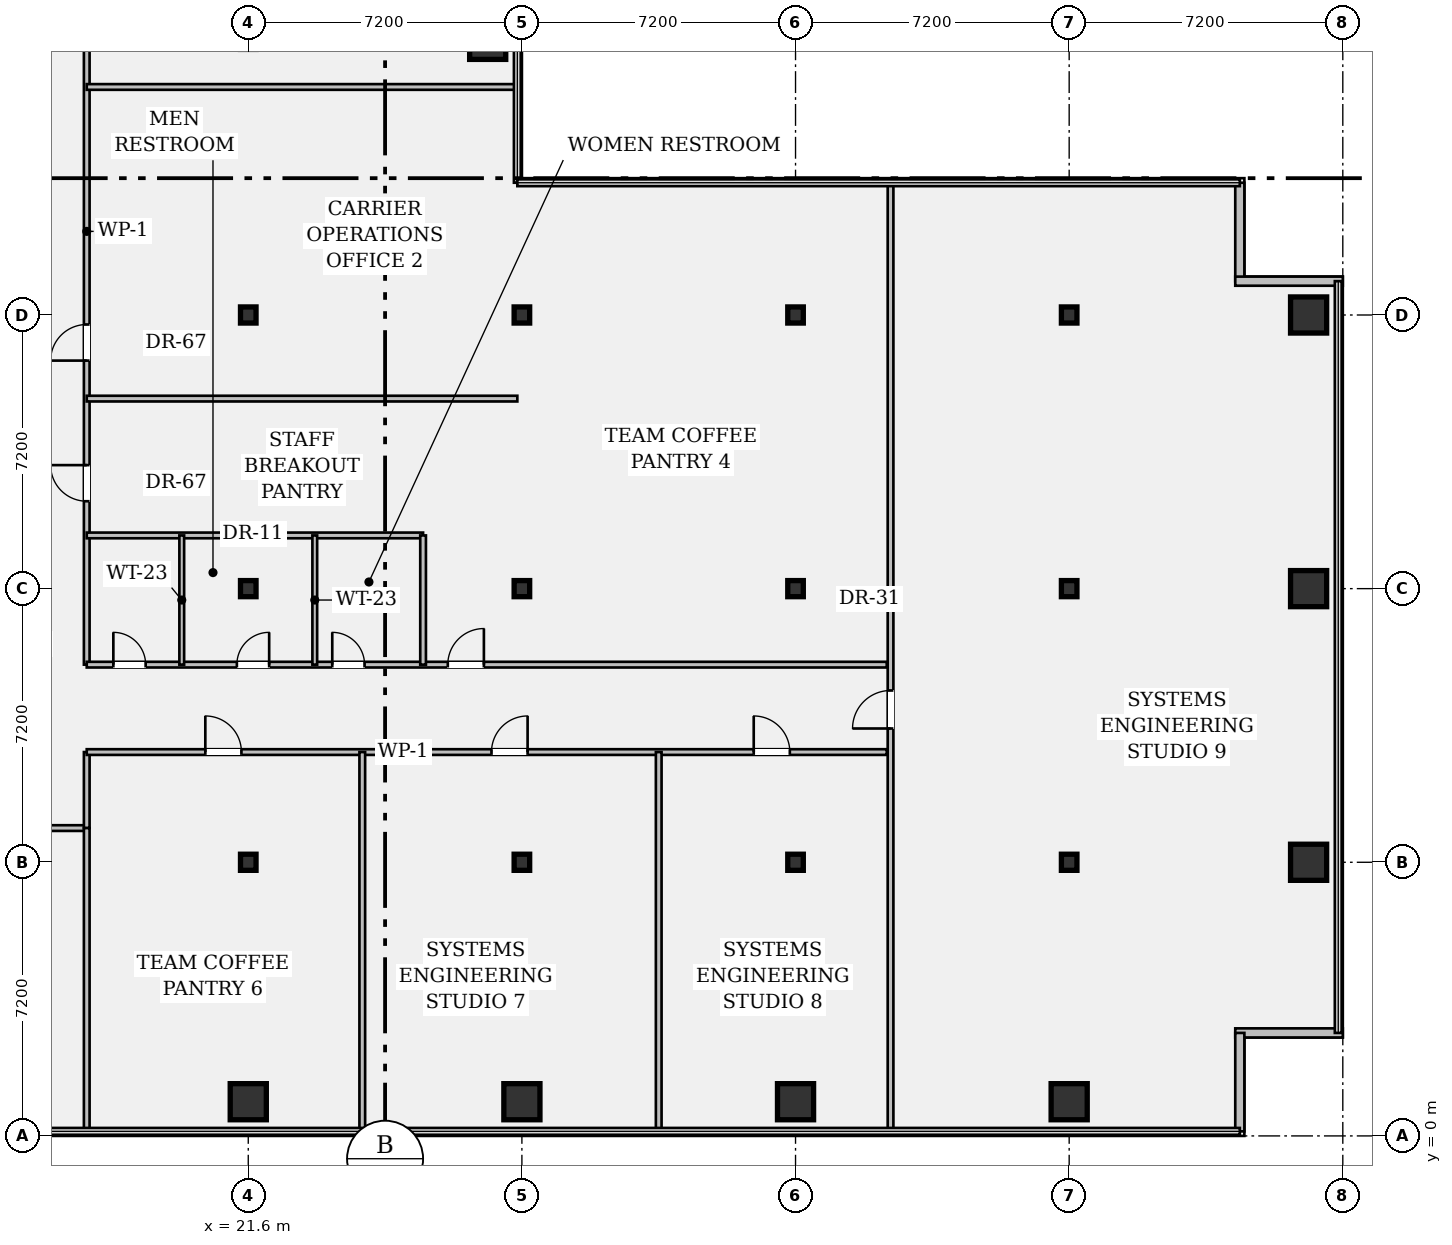
"""IFC4 building model, lengths in metres.
Left out: names, types, materials, properties, quantities, classifications, styles, units other than length and angle.
Written with IfcOpenShell. Run it as: python <this file> out.ifc"""

import sys

from ifc_helpers import new_model, si_unit, direction, frame, frame_2d, origin, origin_2d, place, context, subcontext, project, spatial, rectangle, hollow_rectangle, i_section, extrude, element, fill, save


model = new_model("IFC4")
c1 = context("Model", 3, precision=1e-05, world=origin(), true_north=direction((0.0, 1.0)))
c2 = subcontext(c1, "Body", "Model", "MODEL_VIEW")
j1 = project(units=[si_unit("LENGTHUNIT", "METRE"), si_unit("PLANEANGLEUNIT", "RADIAN")], contexts=[c1])
p1 = place(None, origin())
s1 = spatial("IfcSite", under=j1, at=p1, CompositionType="ELEMENT")
p2 = place(p1, origin())
s2 = spatial("IfcBuilding", under=s1, at=p2, CompositionType="ELEMENT")
p3 = place(p2, frame((0.0, 0.0, 85.05)))
s3 = spatial("IfcBuildingStorey", under=s2, at=p3, CompositionType="ELEMENT", Elevation=85.05)
p4 = place(p3, frame((21.6, 0.9, 0.0), z_axis=(0.0, 0.0, 1.0), x_axis=(1.0, 0.0, 0.0)))
e1 = element("IfcColumn", 1, at=p4, inside=s3, PredefinedType="COLUMN", context=c2, shape_type="SweptSolid", body=[
    extrude(hollow_rectangle(XDim=0.95, YDim=0.95, WallThickness=0.06, at=origin_2d()), origin(), (0.0, 0.0, 1.0), 3.57),
])
for number, where, z_axis, x_axis in (
    (2, (21.6, 7.2, 0.0), (0.0, 0.0, 1.0), (1.0, 0.0, 0.0)),
    (3, (21.6, 14.4, 0.0), (0.0, 0.0, 1.0), (1.0, 0.0, 0.0)),
    (4, (21.6, 21.6, 0.0), (0.0, 0.0, 1.0), (1.0, 0.0, 0.0)),
):
    element("IfcColumn", number, at=place(p3, frame(where, z_axis=z_axis, x_axis=x_axis)), inside=s3, PredefinedType="COLUMN", context=c2, shape_type="SweptSolid", body=[
        extrude(i_section(OverallWidth=0.409, OverallDepth=0.424, WebThickness=0.033, FlangeThickness=0.052, FilletRadius=0.018, at=origin_2d()), origin(), (0.0, 0.0, 1.0), 3.57),
    ])
for number, where, z_axis, x_axis in (
    (5, (27.9, 28.8, 0.0), (0.0, 0.0, 1.0), (1.0, 0.0, 0.0)),
    (6, (28.8, 0.9, 0.0), (0.0, 0.0, 1.0), (1.0, 0.0, 0.0)),
):
    element("IfcColumn", number, at=place(p3, frame(where, z_axis=z_axis, x_axis=x_axis)), inside=s3, PredefinedType="COLUMN", context=c2, shape_type="SweptSolid", body=[
        extrude(hollow_rectangle(XDim=0.95, YDim=0.95, WallThickness=0.06, at=origin_2d()), origin(), (0.0, 0.0, 1.0), 3.57),
    ])
for number, where, z_axis, x_axis in (
    (7, (28.8, 7.2, 0.0), (0.0, 0.0, 1.0), (1.0, 0.0, 0.0)),
    (8, (28.8, 14.4, 0.0), (0.0, 0.0, 1.0), (1.0, 0.0, 0.0)),
    (9, (28.8, 21.6, 0.0), (0.0, 0.0, 1.0), (1.0, 0.0, 0.0)),
):
    element("IfcColumn", number, at=place(p3, frame(where, z_axis=z_axis, x_axis=x_axis)), inside=s3, PredefinedType="COLUMN", context=c2, shape_type="SweptSolid", body=[
        extrude(i_section(OverallWidth=0.409, OverallDepth=0.424, WebThickness=0.033, FlangeThickness=0.052, FilletRadius=0.018, at=origin_2d()), origin(), (0.0, 0.0, 1.0), 3.57),
    ])
p5 = place(p3, frame((36.0, 0.9, 0.0), z_axis=(0.0, 0.0, 1.0), x_axis=(1.0, 0.0, 0.0)))
e10 = element("IfcColumn", 10, at=p5, inside=s3, PredefinedType="COLUMN", context=c2, shape_type="SweptSolid", body=[
    extrude(hollow_rectangle(XDim=0.95, YDim=0.95, WallThickness=0.06, at=origin_2d()), origin(), (0.0, 0.0, 1.0), 3.57),
])
for number, where, z_axis, x_axis in (
    (11, (36.0, 7.2, 0.0), (0.0, 0.0, 1.0), (1.0, 0.0, 0.0)),
    (12, (36.0, 14.4, 0.0), (0.0, 0.0, 1.0), (1.0, 0.0, 0.0)),
    (13, (36.0, 21.6, 0.0), (0.0, 0.0, 1.0), (1.0, 0.0, 0.0)),
):
    element("IfcColumn", number, at=place(p3, frame(where, z_axis=z_axis, x_axis=x_axis)), inside=s3, PredefinedType="COLUMN", context=c2, shape_type="SweptSolid", body=[
        extrude(i_section(OverallWidth=0.409, OverallDepth=0.424, WebThickness=0.033, FlangeThickness=0.052, FilletRadius=0.018, at=origin_2d()), origin(), (0.0, 0.0, 1.0), 3.57),
    ])
p6 = place(p3, frame((43.2, 0.9, 0.0), z_axis=(0.0, 0.0, 1.0), x_axis=(1.0, 0.0, 0.0)))
e14 = element("IfcColumn", 14, at=p6, inside=s3, PredefinedType="COLUMN", context=c2, shape_type="SweptSolid", body=[
    extrude(hollow_rectangle(XDim=0.95, YDim=0.95, WallThickness=0.06, at=origin_2d()), origin(), (0.0, 0.0, 1.0), 3.57),
])
for number, where, z_axis, x_axis in (
    (15, (43.2, 7.2, 0.0), (0.0, 0.0, 1.0), (1.0, 0.0, 0.0)),
    (16, (43.2, 14.4, 0.0), (0.0, 0.0, 1.0), (1.0, 0.0, 0.0)),
    (17, (43.2, 21.6, 0.0), (0.0, 0.0, 1.0), (1.0, 0.0, 0.0)),
):
    element("IfcColumn", number, at=place(p3, frame(where, z_axis=z_axis, x_axis=x_axis)), inside=s3, PredefinedType="COLUMN", context=c2, shape_type="SweptSolid", body=[
        extrude(i_section(OverallWidth=0.409, OverallDepth=0.424, WebThickness=0.033, FlangeThickness=0.052, FilletRadius=0.018, at=origin_2d()), origin(), (0.0, 0.0, 1.0), 3.57),
    ])
for number, where, z_axis, x_axis in (
    (18, (49.5, 7.2, 0.0), (0.0, 0.0, 1.0), (1.0, 0.0, 0.0)),
    (19, (49.5, 14.4, 0.0), (0.0, 0.0, 1.0), (1.0, 0.0, 0.0)),
    (20, (49.5, 21.6, 0.0), (0.0, 0.0, 1.0), (1.0, 0.0, 0.0)),
):
    element("IfcColumn", number, at=place(p3, frame(where, z_axis=z_axis, x_axis=x_axis)), inside=s3, PredefinedType="COLUMN", context=c2, shape_type="SweptSolid", body=[
        extrude(hollow_rectangle(XDim=0.95, YDim=0.95, WallThickness=0.06, at=origin_2d()), origin(), (0.0, 0.0, 1.0), 3.57),
    ])
p7 = place(p3, frame((47.69, 25.08, 0.0), z_axis=(0.0, 0.0, 1.0), x_axis=(0.0, -1.0, 0.0)))
e21 = element("IfcWall", 21, at=p7, inside=s3, PredefinedType="STANDARD", context=c2, shape_type="SweptSolid", body=[
    extrude(rectangle(XDim=2.59, YDim=0.24, at=frame_2d((1.295, 0.0))), origin(), (0.0, 0.0, 1.0), 3.57),
])
for number, where, z_axis, x_axis in (
    (22, (47.57, 22.49, 0.0), (0.0, 0.0, 1.0), (1.0, 0.0, 0.0)),
    (23, (50.4, 2.71, 0.0), (0.0, 0.0, 1.0), (-1.0, 0.0, 0.0)),
):
    element("IfcWall", number, at=place(p3, frame(where, z_axis=z_axis, x_axis=x_axis)), inside=s3, PredefinedType="STANDARD", context=c2, shape_type="SweptSolid", body=[
        extrude(rectangle(XDim=2.83, YDim=0.24, at=frame_2d((1.415, 0.0))), origin(), (0.0, 0.0, 1.0), 3.57),
    ])
p8 = place(p3, frame((47.69, 2.71, 0.0), z_axis=(0.0, 0.0, 1.0), x_axis=(0.0, -1.0, 0.0)))
e24 = element("IfcWall", 24, at=p8, inside=s3, PredefinedType="STANDARD", context=c2, shape_type="SweptSolid", body=[
    extrude(rectangle(XDim=2.59, YDim=0.24, at=frame_2d((1.295, 0.0))), origin(), (0.0, 0.0, 1.0), 3.57),
])
p9 = place(p3, frame((14.4, 8.1, 0.0), z_axis=(0.0, 0.0, 1.0), x_axis=(1.0, 0.0, 0.0)))
e25 = element("IfcWall", 25, at=p9, inside=s3, PredefinedType="PARTITIONING", context=c2, shape_type="SweptSolid", body=[
    extrude(rectangle(XDim=2.95, YDim=0.15, at=frame_2d((1.475, 0.0))), origin(), (0.0, 0.0, 1.0), 3.088),
])
p10 = place(p9, frame((0.95, 0.0, 0.0)))
e26 = element("IfcOpeningElement", 26, at=p10, cuts=e25, PredefinedType="OPENING", context=c2, shape_type="SweptSolid", body=[
    extrude(rectangle(XDim=0.95, YDim=2.15, at=frame_2d((0.475, 1.075))), frame((0.0, 0.087, 0.0), z_axis=(0.0, -1.0, 0.0), x_axis=(1.0, 0.0, 0.0)), (0.0, 0.0, 1.0), 0.174),
])
p11 = place(p3, frame((17.35, 8.1, 0.0), z_axis=(0.0, 0.0, 1.0), x_axis=(0.0, 1.0, 0.0)))
e27 = element("IfcWall", 27, at=p11, inside=s3, PredefinedType="PARTITIONING", context=c2, shape_type="SweptSolid", body=[
    extrude(rectangle(XDim=2.0, YDim=0.15, at=frame_2d((1.0, 0.0))), origin(), (0.0, 0.0, 1.0), 3.57),
])
p12 = place(p3, frame((17.35, 12.4, 0.0), z_axis=(0.0, 0.0, 1.0), x_axis=(0.0, 1.0, 0.0)))
e28 = element("IfcWall", 28, at=p12, inside=s3, PredefinedType="PARTITIONING", context=c2, shape_type="SweptSolid", body=[
    extrude(rectangle(XDim=22.8, YDim=0.15, at=frame_2d((11.4, 0.0))), origin(), (0.0, 0.0, 1.0), 2.783),
])
p13 = place(p12, frame((4.3, 0.0, 0.0)))
e29 = element("IfcOpeningElement", 29, at=p13, cuts=e28, PredefinedType="OPENING", context=c2, shape_type="SweptSolid", body=[
    extrude(rectangle(XDim=0.95, YDim=2.15, at=frame_2d((0.475, 1.075))), frame((0.0, 0.087, 0.0), z_axis=(0.0, -1.0, 0.0), x_axis=(1.0, 0.0, 0.0)), (0.0, 0.0, 1.0), 0.174),
])
p14 = place(p12, frame((8.0, 0.0, 0.0)))
e30 = element("IfcOpeningElement", 30, at=p14, cuts=e28, PredefinedType="OPENING", context=c2, shape_type="SweptSolid", body=[
    extrude(rectangle(XDim=0.95, YDim=2.15, at=frame_2d((0.475, 1.075))), frame((0.0, 0.087, 0.0), z_axis=(0.0, -1.0, 0.0), x_axis=(1.0, 0.0, 0.0)), (0.0, 0.0, 1.0), 0.174),
])
p15 = place(p12, frame((16.2, 0.0, 0.0)))
e31 = element("IfcOpeningElement", 31, at=p15, cuts=e28, PredefinedType="OPENING", context=c2, shape_type="SweptSolid", body=[
    extrude(rectangle(XDim=0.95, YDim=2.15, at=frame_2d((0.475, 1.075))), frame((0.0, 0.087, 0.0), z_axis=(0.0, -1.0, 0.0), x_axis=(1.0, 0.0, 0.0)), (0.0, 0.0, 1.0), 0.174),
])
p16 = place(p3, frame((17.35, 10.1, 0.0), z_axis=(0.0, 0.0, 1.0), x_axis=(1.0, 0.0, 0.0)))
e32 = element("IfcWall", 32, at=p16, inside=s3, PredefinedType="PARTITIONING", context=c2, shape_type="SweptSolid", body=[
    extrude(rectangle(XDim=21.05, YDim=0.15, at=frame_2d((10.525, 0.0))), origin(), (0.0, 0.0, 1.0), 2.783),
])
p17 = place(p16, frame((3.12, 0.0, 0.0)))
e33 = element("IfcOpeningElement", 33, at=p17, cuts=e32, PredefinedType="OPENING", context=c2, shape_type="SweptSolid", body=[
    extrude(rectangle(XDim=0.95, YDim=2.15, at=frame_2d((0.475, 1.075))), frame((0.0, 0.087, 0.0), z_axis=(0.0, -1.0, 0.0), x_axis=(1.0, 0.0, 0.0)), (0.0, 0.0, 1.0), 0.174),
])
p18 = place(p16, frame((10.65, 0.0, 0.0)))
e34 = element("IfcOpeningElement", 34, at=p18, cuts=e32, PredefinedType="OPENING", context=c2, shape_type="SweptSolid", body=[
    extrude(rectangle(XDim=0.95, YDim=2.15, at=frame_2d((0.475, 1.075))), frame((0.0, 0.087, 0.0), z_axis=(0.0, -1.0, 0.0), x_axis=(1.0, 0.0, 0.0)), (0.0, 0.0, 1.0), 0.174),
])
p19 = place(p16, frame((17.55, 0.0, 0.0)))
e35 = element("IfcOpeningElement", 35, at=p19, cuts=e32, PredefinedType="OPENING", context=c2, shape_type="SweptSolid", body=[
    extrude(rectangle(XDim=0.95, YDim=2.15, at=frame_2d((0.475, 1.075))), frame((0.0, 0.087, 0.0), z_axis=(0.0, -1.0, 0.0), x_axis=(1.0, 0.0, 0.0)), (0.0, 0.0, 1.0), 0.174),
])
p20 = place(p3, frame((17.35, 12.4, 0.0), z_axis=(0.0, 0.0, 1.0), x_axis=(1.0, 0.0, 0.0)))
e36 = element("IfcWall", 36, at=p20, inside=s3, PredefinedType="PARTITIONING", context=c2, shape_type="SweptSolid", body=[
    extrude(rectangle(XDim=21.05, YDim=0.15, at=frame_2d((10.525, 0.0))), origin(), (0.0, 0.0, 1.0), 2.783),
])
p21 = place(p20, frame((0.7, 0.0, 0.0)))
e37 = element("IfcOpeningElement", 37, at=p21, cuts=e36, PredefinedType="OPENING", context=c2, shape_type="SweptSolid", body=[
    extrude(rectangle(XDim=0.85, YDim=2.15, at=frame_2d((0.425, 1.075))), frame((0.0, 0.087, 0.0), z_axis=(0.0, -1.0, 0.0), x_axis=(1.0, 0.0, 0.0)), (0.0, 0.0, 1.0), 0.174),
])
p22 = place(p20, frame((3.95, 0.0, 0.0)))
e38 = element("IfcOpeningElement", 38, at=p22, cuts=e36, PredefinedType="OPENING", context=c2, shape_type="SweptSolid", body=[
    extrude(rectangle(XDim=0.85, YDim=2.15, at=frame_2d((0.425, 1.075))), frame((0.0, 0.087, 0.0), z_axis=(0.0, -1.0, 0.0), x_axis=(1.0, 0.0, 0.0)), (0.0, 0.0, 1.0), 0.174),
])
p23 = place(p20, frame((6.46, 0.0, 0.0)))
e39 = element("IfcOpeningElement", 39, at=p23, cuts=e36, PredefinedType="OPENING", context=c2, shape_type="SweptSolid", body=[
    extrude(rectangle(XDim=0.85, YDim=2.15, at=frame_2d((0.425, 1.075))), frame((0.0, 0.087, 0.0), z_axis=(0.0, -1.0, 0.0), x_axis=(1.0, 0.0, 0.0)), (0.0, 0.0, 1.0), 0.174),
])
p24 = place(p20, frame((9.5, 0.0, 0.0)))
e40 = element("IfcOpeningElement", 40, at=p24, cuts=e36, PredefinedType="OPENING", context=c2, shape_type="SweptSolid", body=[
    extrude(rectangle(XDim=0.95, YDim=2.15, at=frame_2d((0.475, 1.075))), frame((0.0, 0.087, 0.0), z_axis=(0.0, -1.0, 0.0), x_axis=(1.0, 0.0, 0.0)), (0.0, 0.0, 1.0), 0.174),
])
p25 = place(p3, frame((38.5, 0.12, 0.0), z_axis=(0.0, 0.0, 1.0), x_axis=(0.0, 1.0, 0.0)))
e41 = element("IfcWall", 41, at=p25, inside=s3, PredefinedType="PARTITIONING", context=c2, shape_type="SweptSolid", body=[
    extrude(rectangle(XDim=24.96, YDim=0.15, at=frame_2d((12.48, 0.0))), origin(), (0.0, 0.0, 1.0), 2.783),
])
p26 = place(p25, frame((10.6, 0.0, 0.0)))
e42 = element("IfcOpeningElement", 42, at=p26, cuts=e41, PredefinedType="OPENING", context=c2, shape_type="SweptSolid", body=[
    extrude(rectangle(XDim=1.0, YDim=2.15, at=frame_2d((0.5, 1.075))), frame((0.0, 0.087, 0.0), z_axis=(0.0, -1.0, 0.0), x_axis=(1.0, 0.0, 0.0)), (0.0, 0.0, 1.0), 0.174),
])
p27 = place(p3, frame((17.35, 15.8, 0.0), z_axis=(0.0, 0.0, 1.0), x_axis=(1.0, 0.0, 0.0)))
e43 = element("IfcWall", 43, at=p27, inside=s3, PredefinedType="PARTITIONING", context=c2, shape_type="SweptSolid", body=[
    extrude(rectangle(XDim=8.85, YDim=0.15, at=frame_2d((4.425, 0.0))), origin(), (0.0, 0.0, 1.0), 2.783),
])
p28 = place(p3, frame((26.2, 12.4, 0.0), z_axis=(0.0, 0.0, 1.0), x_axis=(0.0, 1.0, 0.0)))
e44 = element("IfcWall", 44, at=p28, inside=s3, PredefinedType="PARTITIONING", context=c2, shape_type="SweptSolid", body=[
    extrude(rectangle(XDim=3.4, YDim=0.15, at=frame_2d((1.7, 0.0))), origin(), (0.0, 0.0, 1.0), 2.783),
])
for number, where, z_axis, x_axis in (
    (45, (19.85, 12.4, 0.0), (0.0, 0.0, 1.0), (0.0, 1.0, 0.0)),
    (46, (23.35, 12.4, 0.0), (0.0, 0.0, 1.0), (0.0, 1.0, 0.0)),
):
    element("IfcWall", number, at=place(p3, frame(where, z_axis=z_axis, x_axis=x_axis)), inside=s3, PredefinedType="PARTITIONING", context=c2, shape_type="SweptSolid", body=[
        extrude(rectangle(XDim=3.4, YDim=0.125, at=frame_2d((1.7, 0.0))), origin(), (0.0, 0.0, 1.0), 2.783),
    ])
for number, where, z_axis, x_axis in (
    (47, (17.35, 19.4, 0.0), (0.0, 0.0, 1.0), (1.0, 0.0, 0.0)),
    (48, (17.35, 27.6, 0.0), (0.0, 0.0, 1.0), (1.0, 0.0, 0.0)),
):
    element("IfcWall", number, at=place(p3, frame(where, z_axis=z_axis, x_axis=x_axis)), inside=s3, PredefinedType="PARTITIONING", context=c2, shape_type="SweptSolid", body=[
        extrude(rectangle(XDim=11.33, YDim=0.15, at=frame_2d((5.665, 0.0))), origin(), (0.0, 0.0, 1.0), 2.783),
    ])
p29 = place(p3, frame((17.35, 0.12, 0.0), z_axis=(0.0, 0.0, 1.0), x_axis=(0.0, 1.0, 0.0)))
e49 = element("IfcWall", 49, at=p29, inside=s3, PredefinedType="PARTITIONING", context=c2, shape_type="SweptSolid", body=[
    extrude(rectangle(XDim=7.98, YDim=0.15, at=frame_2d((3.99, 0.0))), origin(), (0.0, 0.0, 1.0), 2.783),
])
for number, where, z_axis, x_axis in (
    (50, (24.6, 0.12, 0.0), (0.0, 0.0, 1.0), (0.0, 1.0, 0.0)),
    (51, (32.4, 0.12, 0.0), (0.0, 0.0, 1.0), (0.0, 1.0, 0.0)),
):
    element("IfcWall", number, at=place(p3, frame(where, z_axis=z_axis, x_axis=x_axis)), inside=s3, PredefinedType="PARTITIONING", context=c2, shape_type="SweptSolid", body=[
        extrude(rectangle(XDim=9.98, YDim=0.15, at=frame_2d((4.99, 0.0))), origin(), (0.0, 0.0, 1.0), 2.783),
    ])
p30 = place(p21, origin())
e52 = element("IfcDoor", 52, at=p30, inside=s3, OperationType="SINGLE_SWING_LEFT", PredefinedType="DOOR", context=c2, shape_type="SweptSolid", body=[
    extrude(rectangle(XDim=0.85, YDim=2.15, at=frame_2d((0.425, 1.075))), frame((0.0, 0.025, 0.0), z_axis=(0.0, -1.0, 0.0), x_axis=(1.0, 0.0, 0.0)), (0.0, 0.0, 1.0), 0.05),
])
fill(e37, e52)
p31 = place(p22, origin())
e53 = element("IfcDoor", 53, at=p31, inside=s3, OperationType="SINGLE_SWING_RIGHT", PredefinedType="DOOR", context=c2, shape_type="SweptSolid", body=[
    extrude(rectangle(XDim=0.85, YDim=2.15, at=frame_2d((0.425, 1.075))), frame((0.0, 0.025, 0.0), z_axis=(0.0, -1.0, 0.0), x_axis=(1.0, 0.0, 0.0)), (0.0, 0.0, 1.0), 0.05),
])
fill(e38, e53)
p32 = place(p23, origin())
e54 = element("IfcDoor", 54, at=p32, inside=s3, OperationType="SINGLE_SWING_LEFT", PredefinedType="DOOR", context=c2, shape_type="SweptSolid", body=[
    extrude(rectangle(XDim=0.85, YDim=2.15, at=frame_2d((0.425, 1.075))), frame((0.0, 0.025, 0.0), z_axis=(0.0, -1.0, 0.0), x_axis=(1.0, 0.0, 0.0)), (0.0, 0.0, 1.0), 0.05),
])
fill(e39, e54)
p33 = place(p13, origin())
e55 = element("IfcDoor", 55, at=p33, inside=s3, OperationType="SINGLE_SWING_RIGHT", PredefinedType="DOOR", context=c2, shape_type="SweptSolid", body=[
    extrude(rectangle(XDim=0.95, YDim=2.15, at=frame_2d((0.475, 1.075))), frame((0.0, 0.025, 0.0), z_axis=(0.0, -1.0, 0.0), x_axis=(1.0, 0.0, 0.0)), (0.0, 0.0, 1.0), 0.05),
])
fill(e29, e55)
p34 = place(p14, origin())
e56 = element("IfcDoor", 56, at=p34, inside=s3, OperationType="SINGLE_SWING_LEFT", PredefinedType="DOOR", context=c2, shape_type="SweptSolid", body=[
    extrude(rectangle(XDim=0.95, YDim=2.15, at=frame_2d((0.475, 1.075))), frame((0.0, 0.025, 0.0), z_axis=(0.0, -1.0, 0.0), x_axis=(1.0, 0.0, 0.0)), (0.0, 0.0, 1.0), 0.05),
])
fill(e30, e56)
p35 = place(p24, origin())
e57 = element("IfcDoor", 57, at=p35, inside=s3, OperationType="SINGLE_SWING_RIGHT", PredefinedType="DOOR", context=c2, shape_type="SweptSolid", body=[
    extrude(rectangle(XDim=0.95, YDim=2.15, at=frame_2d((0.475, 1.075))), frame((0.0, 0.025, 0.0), z_axis=(0.0, -1.0, 0.0), x_axis=(1.0, 0.0, 0.0)), (0.0, 0.0, 1.0), 0.05),
])
fill(e40, e57)
p36 = place(p17, origin())
e58 = element("IfcDoor", 58, at=p36, inside=s3, OperationType="SINGLE_SWING_LEFT", PredefinedType="DOOR", context=c2, shape_type="SweptSolid", body=[
    extrude(rectangle(XDim=0.95, YDim=2.15, at=frame_2d((0.475, 1.075))), frame((0.0, 0.025, 0.0), z_axis=(0.0, -1.0, 0.0), x_axis=(1.0, 0.0, 0.0)), (0.0, 0.0, 1.0), 0.05),
])
fill(e33, e58)
p37 = place(p18, origin())
e59 = element("IfcDoor", 59, at=p37, inside=s3, OperationType="SINGLE_SWING_RIGHT", PredefinedType="DOOR", context=c2, shape_type="SweptSolid", body=[
    extrude(rectangle(XDim=0.95, YDim=2.15, at=frame_2d((0.475, 1.075))), frame((0.0, 0.025, 0.0), z_axis=(0.0, -1.0, 0.0), x_axis=(1.0, 0.0, 0.0)), (0.0, 0.0, 1.0), 0.05),
])
fill(e34, e59)
p38 = place(p19, origin())
e60 = element("IfcDoor", 60, at=p38, inside=s3, OperationType="SINGLE_SWING_LEFT", PredefinedType="DOOR", context=c2, shape_type="SweptSolid", body=[
    extrude(rectangle(XDim=0.95, YDim=2.15, at=frame_2d((0.475, 1.075))), frame((0.0, 0.025, 0.0), z_axis=(0.0, -1.0, 0.0), x_axis=(1.0, 0.0, 0.0)), (0.0, 0.0, 1.0), 0.05),
])
fill(e35, e60)
p39 = place(p26, origin())
e61 = element("IfcDoor", 61, at=p39, inside=s3, OperationType="SINGLE_SWING_LEFT", PredefinedType="DOOR", context=c2, shape_type="SweptSolid", body=[
    extrude(rectangle(XDim=1.0, YDim=2.15, at=frame_2d((0.5, 1.075))), frame((0.0, 0.025, 0.0), z_axis=(0.0, -1.0, 0.0), x_axis=(1.0, 0.0, 0.0)), (0.0, 0.0, 1.0), 0.05),
])
fill(e42, e61)
save(model, sys.argv[1])
